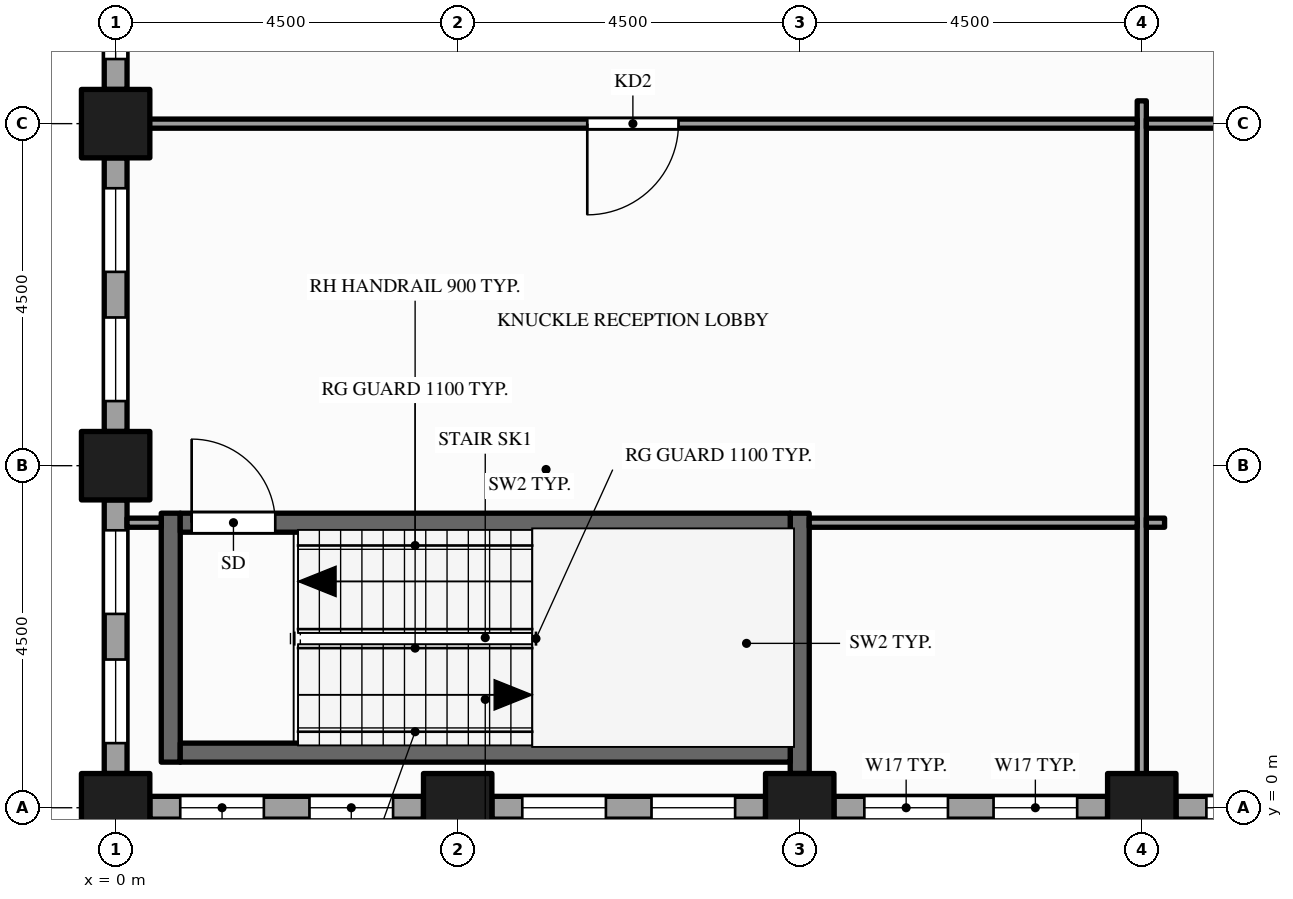
"""IFC4 building model, lengths in metres.
Left out: names, types, materials, properties, quantities, classifications, styles, units other than length and angle.
Written with IfcOpenShell. Run it as: python <this file> out.ifc"""

import sys

from ifc_helpers import new_model, si_unit, direction, frame, frame_2d, origin, origin_2d, place, context, subcontext, project, spatial, rectangle, hollow_rectangle, extrude, element, fill, save


model = new_model("IFC4")
c1 = context("Model", 3, precision=1e-05, world=origin(), true_north=direction((0.0, 1.0)))
c2 = subcontext(c1, "Body", "Model", "MODEL_VIEW")
j1 = project(units=[si_unit("LENGTHUNIT", "METRE"), si_unit("PLANEANGLEUNIT", "RADIAN")], contexts=[c1])
p1 = place(None, origin())
s1 = spatial("IfcSite", under=j1, at=p1, CompositionType="ELEMENT")
p2 = place(p1, origin())
s2 = spatial("IfcBuilding", under=s1, at=p2, CompositionType="ELEMENT")
p3 = place(p2, frame((0.0, 0.0, 179.0)))
s3 = spatial("IfcBuildingStorey", under=s2, at=p3, CompositionType="ELEMENT", Elevation=179.0)
for number, where, z_axis, x_axis in (
    (1, (0.0, 0.0, -0.15), (0.0, 0.0, 1.0), (1.0, 0.0, 0.0)),
    (2, (0.0, 4.5, -0.15), (0.0, 0.0, 1.0), (1.0, 0.0, 0.0)),
    (3, (0.0, 9.0, -0.15), (0.0, 0.0, 1.0), (1.0, 0.0, 0.0)),
    (4, (4.5, 0.0, -0.15), (0.0, 0.0, 1.0), (1.0, 0.0, 0.0)),
    (5, (9.0, 0.0, -0.15), (0.0, 0.0, 1.0), (1.0, 0.0, 0.0)),
    (6, (13.5, 0.0, -0.15), (0.0, 0.0, 1.0), (1.0, 0.0, 0.0)),
):
    element("IfcColumn", number, at=place(p3, frame(where, z_axis=z_axis, x_axis=x_axis)), inside=s3, PredefinedType="COLUMN", context=c2, shape_type="SweptSolid", body=[
        extrude(hollow_rectangle(XDim=0.9, YDim=0.9, WallThickness=0.045, at=origin_2d()), origin(), (0.0, 0.0, 1.0), 4.0),
    ])
p4 = place(p3, frame((0.45, 0.0, 0.0), z_axis=(0.0, 0.0, 1.0), x_axis=(1.0, 0.0, 0.0)))
e7 = element("IfcWall", 7, at=p4, inside=s3, PredefinedType="STANDARD", context=c2, shape_type="SweptSolid", body=[
    extrude(rectangle(XDim=3.6, YDim=0.3, at=frame_2d((1.8, 0.0))), origin(), (0.0, 0.0, 1.0), 3.149),
])
p5 = place(p4, frame((0.4, 0.0, 0.9)))
e8 = element("IfcOpeningElement", 8, at=p5, cuts=e7, PredefinedType="OPENING", context=c2, shape_type="SweptSolid", body=[
    extrude(rectangle(XDim=1.1, YDim=2.0, at=frame_2d((0.55, 1.0))), frame((0.0, 0.16, 0.0), z_axis=(0.0, -1.0, 0.0), x_axis=(1.0, 0.0, 0.0)), (0.0, 0.0, 1.0), 0.32),
])
p6 = place(p4, frame((2.1, 0.0, 0.9)))
e9 = element("IfcOpeningElement", 9, at=p6, cuts=e7, PredefinedType="OPENING", context=c2, shape_type="SweptSolid", body=[
    extrude(rectangle(XDim=1.1, YDim=2.0, at=frame_2d((0.55, 1.0))), frame((0.0, 0.16, 0.0), z_axis=(0.0, -1.0, 0.0), x_axis=(1.0, 0.0, 0.0)), (0.0, 0.0, 1.0), 0.32),
])
p7 = place(p3, frame((4.95, 0.0, 0.0), z_axis=(0.0, 0.0, 1.0), x_axis=(1.0, 0.0, 0.0)))
e10 = element("IfcWall", 10, at=p7, inside=s3, PredefinedType="STANDARD", context=c2, shape_type="SweptSolid", body=[
    extrude(rectangle(XDim=3.6, YDim=0.3, at=frame_2d((1.8, 0.0))), origin(), (0.0, 0.0, 1.0), 3.149),
])
p8 = place(p7, frame((0.4, 0.0, 0.9)))
e11 = element("IfcOpeningElement", 11, at=p8, cuts=e10, PredefinedType="OPENING", context=c2, shape_type="SweptSolid", body=[
    extrude(rectangle(XDim=1.1, YDim=2.0, at=frame_2d((0.55, 1.0))), frame((0.0, 0.16, 0.0), z_axis=(0.0, -1.0, 0.0), x_axis=(1.0, 0.0, 0.0)), (0.0, 0.0, 1.0), 0.32),
])
p9 = place(p7, frame((2.1, 0.0, 0.9)))
e12 = element("IfcOpeningElement", 12, at=p9, cuts=e10, PredefinedType="OPENING", context=c2, shape_type="SweptSolid", body=[
    extrude(rectangle(XDim=1.1, YDim=2.0, at=frame_2d((0.55, 1.0))), frame((0.0, 0.16, 0.0), z_axis=(0.0, -1.0, 0.0), x_axis=(1.0, 0.0, 0.0)), (0.0, 0.0, 1.0), 0.32),
])
p10 = place(p3, frame((9.45, 0.0, 0.0), z_axis=(0.0, 0.0, 1.0), x_axis=(1.0, 0.0, 0.0)))
e13 = element("IfcWall", 13, at=p10, inside=s3, PredefinedType="STANDARD", context=c2, shape_type="SweptSolid", body=[
    extrude(rectangle(XDim=3.6, YDim=0.3, at=frame_2d((1.8, 0.0))), origin(), (0.0, 0.0, 1.0), 2.87),
])
p11 = place(p10, frame((0.4, 0.0, 0.9)))
e14 = element("IfcOpeningElement", 14, at=p11, cuts=e13, PredefinedType="OPENING", context=c2, shape_type="SweptSolid", body=[
    extrude(rectangle(XDim=1.1, YDim=1.75, at=frame_2d((0.55, 0.875))), frame((0.0, 0.16, 0.0), z_axis=(0.0, -1.0, 0.0), x_axis=(1.0, 0.0, 0.0)), (0.0, 0.0, 1.0), 0.32),
])
p12 = place(p10, frame((2.1, 0.0, 0.9)))
e15 = element("IfcOpeningElement", 15, at=p12, cuts=e13, PredefinedType="OPENING", context=c2, shape_type="SweptSolid", body=[
    extrude(rectangle(XDim=1.1, YDim=1.75, at=frame_2d((0.55, 0.875))), frame((0.0, 0.16, 0.0), z_axis=(0.0, -1.0, 0.0), x_axis=(1.0, 0.0, 0.0)), (0.0, 0.0, 1.0), 0.32),
])
p13 = place(p3, frame((13.95, 0.0, 0.0), z_axis=(0.0, 0.0, 1.0), x_axis=(1.0, 0.0, 0.0)))
e16 = element("IfcWall", 16, at=p13, inside=s3, PredefinedType="STANDARD", context=c2, shape_type="SweptSolid", body=[
    extrude(rectangle(XDim=3.6, YDim=0.3, at=frame_2d((1.8, 0.0))), origin(), (0.0, 0.0, 1.0), 2.87),
])
p14 = place(p13, frame((0.4, 0.0, 0.9)))
e17 = element("IfcOpeningElement", 17, at=p14, cuts=e16, PredefinedType="OPENING", context=c2, shape_type="SweptSolid", body=[
    extrude(rectangle(XDim=1.1, YDim=1.75, at=frame_2d((0.55, 0.875))), frame((0.0, 0.16, 0.0), z_axis=(0.0, -1.0, 0.0), x_axis=(1.0, 0.0, 0.0)), (0.0, 0.0, 1.0), 0.32),
])
p15 = place(p13, frame((2.1, 0.0, 0.9)))
e18 = element("IfcOpeningElement", 18, at=p15, cuts=e16, PredefinedType="OPENING", context=c2, shape_type="SweptSolid", body=[
    extrude(rectangle(XDim=1.1, YDim=1.75, at=frame_2d((0.55, 0.875))), frame((0.0, 0.16, 0.0), z_axis=(0.0, -1.0, 0.0), x_axis=(1.0, 0.0, 0.0)), (0.0, 0.0, 1.0), 0.32),
])
p16 = place(p3, frame((0.0, 13.05, 0.0), z_axis=(0.0, 0.0, 1.0), x_axis=(0.0, -1.0, 0.0)))
e19 = element("IfcWall", 19, at=p16, inside=s3, PredefinedType="STANDARD", context=c2, shape_type="SweptSolid", body=[
    extrude(rectangle(XDim=3.6, YDim=0.3, at=frame_2d((1.8, 0.0))), origin(), (0.0, 0.0, 1.0), 3.149),
])
p17 = place(p16, frame((0.4, 0.0, 0.9)))
e20 = element("IfcOpeningElement", 20, at=p17, cuts=e19, PredefinedType="OPENING", context=c2, shape_type="SweptSolid", body=[
    extrude(rectangle(XDim=1.1, YDim=2.0, at=frame_2d((0.55, 1.0))), frame((0.0, 0.16, 0.0), z_axis=(0.0, -1.0, 0.0), x_axis=(1.0, 0.0, 0.0)), (0.0, 0.0, 1.0), 0.32),
])
p18 = place(p16, frame((2.1, 0.0, 0.9)))
e21 = element("IfcOpeningElement", 21, at=p18, cuts=e19, PredefinedType="OPENING", context=c2, shape_type="SweptSolid", body=[
    extrude(rectangle(XDim=1.1, YDim=2.0, at=frame_2d((0.55, 1.0))), frame((0.0, 0.16, 0.0), z_axis=(0.0, -1.0, 0.0), x_axis=(1.0, 0.0, 0.0)), (0.0, 0.0, 1.0), 0.32),
])
p19 = place(p3, frame((0.0, 8.55, 0.0), z_axis=(0.0, 0.0, 1.0), x_axis=(0.0, -1.0, 0.0)))
e22 = element("IfcWall", 22, at=p19, inside=s3, PredefinedType="STANDARD", context=c2, shape_type="SweptSolid", body=[
    extrude(rectangle(XDim=3.6, YDim=0.3, at=frame_2d((1.8, 0.0))), origin(), (0.0, 0.0, 1.0), 3.149),
])
p20 = place(p19, frame((0.4, 0.0, 0.9)))
e23 = element("IfcOpeningElement", 23, at=p20, cuts=e22, PredefinedType="OPENING", context=c2, shape_type="SweptSolid", body=[
    extrude(rectangle(XDim=1.1, YDim=2.0, at=frame_2d((0.55, 1.0))), frame((0.0, 0.16, 0.0), z_axis=(0.0, -1.0, 0.0), x_axis=(1.0, 0.0, 0.0)), (0.0, 0.0, 1.0), 0.32),
])
p21 = place(p19, frame((2.1, 0.0, 0.9)))
e24 = element("IfcOpeningElement", 24, at=p21, cuts=e22, PredefinedType="OPENING", context=c2, shape_type="SweptSolid", body=[
    extrude(rectangle(XDim=1.1, YDim=2.0, at=frame_2d((0.55, 1.0))), frame((0.0, 0.16, 0.0), z_axis=(0.0, -1.0, 0.0), x_axis=(1.0, 0.0, 0.0)), (0.0, 0.0, 1.0), 0.32),
])
p22 = place(p3, frame((0.0, 4.05, 0.0), z_axis=(0.0, 0.0, 1.0), x_axis=(0.0, -1.0, 0.0)))
e25 = element("IfcWall", 25, at=p22, inside=s3, PredefinedType="STANDARD", context=c2, shape_type="SweptSolid", body=[
    extrude(rectangle(XDim=3.6, YDim=0.3, at=frame_2d((1.8, 0.0))), origin(), (0.0, 0.0, 1.0), 3.149),
])
p23 = place(p22, frame((0.4, 0.0, 0.9)))
e26 = element("IfcOpeningElement", 26, at=p23, cuts=e25, PredefinedType="OPENING", context=c2, shape_type="SweptSolid", body=[
    extrude(rectangle(XDim=1.1, YDim=2.0, at=frame_2d((0.55, 1.0))), frame((0.0, 0.16, 0.0), z_axis=(0.0, -1.0, 0.0), x_axis=(1.0, 0.0, 0.0)), (0.0, 0.0, 1.0), 0.32),
])
p24 = place(p22, frame((2.1, 0.0, 0.9)))
e27 = element("IfcOpeningElement", 27, at=p24, cuts=e25, PredefinedType="OPENING", context=c2, shape_type="SweptSolid", body=[
    extrude(rectangle(XDim=1.1, YDim=2.0, at=frame_2d((0.55, 1.0))), frame((0.0, 0.16, 0.0), z_axis=(0.0, -1.0, 0.0), x_axis=(1.0, 0.0, 0.0)), (0.0, 0.0, 1.0), 0.32),
])
p25 = place(p3, frame((0.725, 0.6, 0.0), z_axis=(0.0, 0.0, 1.0), x_axis=(0.0, 1.0, 0.0)))
e28 = element("IfcWall", 28, at=p25, inside=s3, PredefinedType="SHEAR", context=c2, shape_type="SweptSolid", body=[
    extrude(rectangle(XDim=3.275, YDim=0.25, at=frame_2d((1.637, 0.0))), origin(), (0.0, 0.0, 1.0), 3.85),
])
p26 = place(p3, frame((9.0, 0.45, 0.0), z_axis=(0.0, 0.0, 1.0), x_axis=(0.0, 1.0, 0.0)))
e29 = element("IfcWall", 29, at=p26, inside=s3, PredefinedType="SHEAR", context=c2, shape_type="SweptSolid", body=[
    extrude(rectangle(XDim=3.425, YDim=0.25, at=frame_2d((1.712, 0.0))), origin(), (0.0, 0.0, 1.0), 3.85),
])
p27 = place(p3, frame((13.5, 0.15, 0.0), z_axis=(0.0, 0.0, 1.0), x_axis=(0.0, 1.0, 0.0)))
e30 = element("IfcWall", 30, at=p27, inside=s3, PredefinedType="PARTITIONING", context=c2, shape_type="SweptSolid", body=[
    extrude(rectangle(XDim=9.15, YDim=0.12, at=frame_2d((4.575, 0.0))), origin(), (0.0, 0.0, 1.0), 2.87),
])
p28 = place(p3, frame((0.85, 0.725, 0.0), z_axis=(0.0, 0.0, 1.0), x_axis=(1.0, 0.0, 0.0)))
e31 = element("IfcWall", 31, at=p28, inside=s3, PredefinedType="SHEAR", context=c2, shape_type="SweptSolid", body=[
    extrude(rectangle(XDim=8.025, YDim=0.25, at=frame_2d((4.012, 0.0))), origin(), (0.0, 0.0, 1.0), 3.85),
])
p29 = place(p3, frame((0.15, 3.75, 0.0), z_axis=(0.0, 0.0, 1.0), x_axis=(1.0, 0.0, 0.0)))
e32 = element("IfcWall", 32, at=p29, inside=s3, PredefinedType="PARTITIONING", context=c2, shape_type="SweptSolid", body=[
    extrude(rectangle(XDim=0.45, YDim=0.12, at=frame_2d((0.225, 0.0))), origin(), (0.0, 0.0, 1.0), 3.85),
])
p30 = place(p3, frame((0.85, 3.75, 0.0), z_axis=(0.0, 0.0, 1.0), x_axis=(1.0, 0.0, 0.0)))
e33 = element("IfcWall", 33, at=p30, inside=s3, PredefinedType="SHEAR", context=c2, shape_type="SweptSolid", body=[
    extrude(rectangle(XDim=8.025, YDim=0.25, at=frame_2d((4.012, 0.0))), origin(), (0.0, 0.0, 1.0), 3.85),
])
p31 = place(p30, frame((0.15, 0.0, 0.0)))
e34 = element("IfcOpeningElement", 34, at=p31, cuts=e33, PredefinedType="OPENING", context=c2, shape_type="SweptSolid", body=[
    extrude(rectangle(XDim=1.1, YDim=2.1, at=frame_2d((0.55, 1.05))), frame((0.0, 0.135, 0.0), z_axis=(0.0, -1.0, 0.0), x_axis=(1.0, 0.0, 0.0)), (0.0, 0.0, 1.0), 0.27),
])
p32 = place(p3, frame((9.125, 3.75, 0.0), z_axis=(0.0, 0.0, 1.0), x_axis=(1.0, 0.0, 0.0)))
e35 = element("IfcWall", 35, at=p32, inside=s3, PredefinedType="PARTITIONING", context=c2, shape_type="SweptSolid", body=[
    extrude(rectangle(XDim=4.315, YDim=0.12, at=frame_2d((2.157, 0.0))), origin(), (0.0, 0.0, 1.0), 2.87),
])
p33 = place(p3, frame((13.56, 3.75, 0.0), z_axis=(0.0, 0.0, 1.0), x_axis=(1.0, 0.0, 0.0)))
e36 = element("IfcWall", 36, at=p33, inside=s3, PredefinedType="PARTITIONING", context=c2, shape_type="SweptSolid", body=[
    extrude(rectangle(XDim=0.24, YDim=0.12, at=frame_2d((0.12, 0.0))), origin(), (0.0, 0.0, 1.0), 2.87),
])
p34 = place(p3, frame((0.15, 9.0, 0.0), z_axis=(0.0, 0.0, 1.0), x_axis=(1.0, 0.0, 0.0)))
e37 = element("IfcWall", 37, at=p34, inside=s3, PredefinedType="PARTITIONING", context=c2, shape_type="SweptSolid", body=[
    extrude(rectangle(XDim=13.29, YDim=0.12, at=frame_2d((6.645, 0.0))), origin(), (0.0, 0.0, 1.0), 2.87),
])
p35 = place(p34, frame((6.055, 0.0, 0.0)))
e38 = element("IfcOpeningElement", 38, at=p35, cuts=e37, PredefinedType="OPENING", context=c2, shape_type="SweptSolid", body=[
    extrude(rectangle(XDim=1.2, YDim=2.1, at=frame_2d((0.6, 1.05))), frame((0.0, 0.07, 0.0), z_axis=(0.0, -1.0, 0.0), x_axis=(1.0, 0.0, 0.0)), (0.0, 0.0, 1.0), 0.14),
])
p36 = place(p3, frame((13.56, 9.0, 0.0), z_axis=(0.0, 0.0, 1.0), x_axis=(1.0, 0.0, 0.0)))
e39 = element("IfcWall", 39, at=p36, inside=s3, PredefinedType="PARTITIONING", context=c2, shape_type="SweptSolid", body=[
    extrude(rectangle(XDim=8.88, YDim=0.12, at=frame_2d((4.44, 0.0))), origin(), (0.0, 0.0, 1.0), 2.87),
])
p37 = place(p36, frame((3.54, 0.0, 0.0)))
e40 = element("IfcOpeningElement", 40, at=p37, cuts=e39, PredefinedType="OPENING", context=c2, shape_type="SweptSolid", body=[
    extrude(rectangle(XDim=1.8, YDim=2.1, at=frame_2d((0.9, 1.05))), frame((0.0, 0.07, 0.0), z_axis=(0.0, -1.0, 0.0), x_axis=(1.0, 0.0, 0.0)), (0.0, 0.0, 1.0), 0.14),
])
p38 = place(p5, origin())
e41 = element("IfcWindow", 41, at=p38, inside=s3, PartitioningType="SINGLE_PANEL", PredefinedType="WINDOW", context=c2, shape_type="SweptSolid", body=[
    extrude(rectangle(XDim=1.1, YDim=2.0, at=frame_2d((0.55, 1.0))), frame((0.0, 0.03, 0.0), z_axis=(0.0, -1.0, 0.0), x_axis=(1.0, 0.0, 0.0)), (0.0, 0.0, 1.0), 0.06),
])
fill(e8, e41)
p39 = place(p6, origin())
e42 = element("IfcWindow", 42, at=p39, inside=s3, PartitioningType="SINGLE_PANEL", PredefinedType="WINDOW", context=c2, shape_type="SweptSolid", body=[
    extrude(rectangle(XDim=1.1, YDim=2.0, at=frame_2d((0.55, 1.0))), frame((0.0, 0.03, 0.0), z_axis=(0.0, -1.0, 0.0), x_axis=(1.0, 0.0, 0.0)), (0.0, 0.0, 1.0), 0.06),
])
fill(e9, e42)
p40 = place(p8, origin())
e43 = element("IfcWindow", 43, at=p40, inside=s3, PartitioningType="SINGLE_PANEL", PredefinedType="WINDOW", context=c2, shape_type="SweptSolid", body=[
    extrude(rectangle(XDim=1.1, YDim=2.0, at=frame_2d((0.55, 1.0))), frame((0.0, 0.03, 0.0), z_axis=(0.0, -1.0, 0.0), x_axis=(1.0, 0.0, 0.0)), (0.0, 0.0, 1.0), 0.06),
])
fill(e11, e43)
p41 = place(p9, origin())
e44 = element("IfcWindow", 44, at=p41, inside=s3, PartitioningType="SINGLE_PANEL", PredefinedType="WINDOW", context=c2, shape_type="SweptSolid", body=[
    extrude(rectangle(XDim=1.1, YDim=2.0, at=frame_2d((0.55, 1.0))), frame((0.0, 0.03, 0.0), z_axis=(0.0, -1.0, 0.0), x_axis=(1.0, 0.0, 0.0)), (0.0, 0.0, 1.0), 0.06),
])
fill(e12, e44)
p42 = place(p11, origin())
e45 = element("IfcWindow", 45, at=p42, inside=s3, PartitioningType="SINGLE_PANEL", PredefinedType="WINDOW", context=c2, shape_type="SweptSolid", body=[
    extrude(rectangle(XDim=1.1, YDim=1.75, at=frame_2d((0.55, 0.875))), frame((0.0, 0.03, 0.0), z_axis=(0.0, -1.0, 0.0), x_axis=(1.0, 0.0, 0.0)), (0.0, 0.0, 1.0), 0.06),
])
fill(e14, e45)
p43 = place(p12, origin())
e46 = element("IfcWindow", 46, at=p43, inside=s3, PartitioningType="SINGLE_PANEL", PredefinedType="WINDOW", context=c2, shape_type="SweptSolid", body=[
    extrude(rectangle(XDim=1.1, YDim=1.75, at=frame_2d((0.55, 0.875))), frame((0.0, 0.03, 0.0), z_axis=(0.0, -1.0, 0.0), x_axis=(1.0, 0.0, 0.0)), (0.0, 0.0, 1.0), 0.06),
])
fill(e15, e46)
p44 = place(p14, origin())
e47 = element("IfcWindow", 47, at=p44, inside=s3, PartitioningType="SINGLE_PANEL", PredefinedType="WINDOW", context=c2, shape_type="SweptSolid", body=[
    extrude(rectangle(XDim=1.1, YDim=1.75, at=frame_2d((0.55, 0.875))), frame((0.0, 0.03, 0.0), z_axis=(0.0, -1.0, 0.0), x_axis=(1.0, 0.0, 0.0)), (0.0, 0.0, 1.0), 0.06),
])
fill(e17, e47)
p45 = place(p18, origin())
e48 = element("IfcWindow", 48, at=p45, inside=s3, PartitioningType="SINGLE_PANEL", PredefinedType="WINDOW", context=c2, shape_type="SweptSolid", body=[
    extrude(rectangle(XDim=1.1, YDim=2.0, at=frame_2d((0.55, 1.0))), frame((0.0, 0.03, 0.0), z_axis=(0.0, -1.0, 0.0), x_axis=(1.0, 0.0, 0.0)), (0.0, 0.0, 1.0), 0.06),
])
fill(e21, e48)
p46 = place(p20, origin())
e49 = element("IfcWindow", 49, at=p46, inside=s3, PartitioningType="SINGLE_PANEL", PredefinedType="WINDOW", context=c2, shape_type="SweptSolid", body=[
    extrude(rectangle(XDim=1.1, YDim=2.0, at=frame_2d((0.55, 1.0))), frame((0.0, 0.03, 0.0), z_axis=(0.0, -1.0, 0.0), x_axis=(1.0, 0.0, 0.0)), (0.0, 0.0, 1.0), 0.06),
])
fill(e23, e49)
p47 = place(p21, origin())
e50 = element("IfcWindow", 50, at=p47, inside=s3, PartitioningType="SINGLE_PANEL", PredefinedType="WINDOW", context=c2, shape_type="SweptSolid", body=[
    extrude(rectangle(XDim=1.1, YDim=2.0, at=frame_2d((0.55, 1.0))), frame((0.0, 0.03, 0.0), z_axis=(0.0, -1.0, 0.0), x_axis=(1.0, 0.0, 0.0)), (0.0, 0.0, 1.0), 0.06),
])
fill(e24, e50)
p48 = place(p23, origin())
e51 = element("IfcWindow", 51, at=p48, inside=s3, PartitioningType="SINGLE_PANEL", PredefinedType="WINDOW", context=c2, shape_type="SweptSolid", body=[
    extrude(rectangle(XDim=1.1, YDim=2.0, at=frame_2d((0.55, 1.0))), frame((0.0, 0.03, 0.0), z_axis=(0.0, -1.0, 0.0), x_axis=(1.0, 0.0, 0.0)), (0.0, 0.0, 1.0), 0.06),
])
fill(e26, e51)
p49 = place(p24, origin())
e52 = element("IfcWindow", 52, at=p49, inside=s3, PartitioningType="SINGLE_PANEL", PredefinedType="WINDOW", context=c2, shape_type="SweptSolid", body=[
    extrude(rectangle(XDim=1.1, YDim=2.0, at=frame_2d((0.55, 1.0))), frame((0.0, 0.03, 0.0), z_axis=(0.0, -1.0, 0.0), x_axis=(1.0, 0.0, 0.0)), (0.0, 0.0, 1.0), 0.06),
])
fill(e27, e52)
p50 = place(p31, origin())
e53 = element("IfcDoor", 53, at=p50, inside=s3, OperationType="SINGLE_SWING_LEFT", PredefinedType="DOOR", context=c2, shape_type="SweptSolid", body=[
    extrude(rectangle(XDim=1.1, YDim=2.1, at=frame_2d((0.55, 1.05))), frame((0.0, 0.025, 0.0), z_axis=(0.0, -1.0, 0.0), x_axis=(1.0, 0.0, 0.0)), (0.0, 0.0, 1.0), 0.05),
])
fill(e34, e53)
p51 = place(p35, origin())
e54 = element("IfcDoor", 54, at=p51, inside=s3, OperationType="SINGLE_SWING_LEFT", PredefinedType="DOOR", context=c2, shape_type="SweptSolid", body=[
    extrude(rectangle(XDim=1.2, YDim=2.1, at=frame_2d((0.6, 1.05))), frame((0.0, 0.025, 0.0), z_axis=(0.0, -1.0, 0.0), x_axis=(1.0, 0.0, 0.0)), (0.0, 0.0, 1.0), 0.05),
])
fill(e38, e54)
save(model, sys.argv[1])
